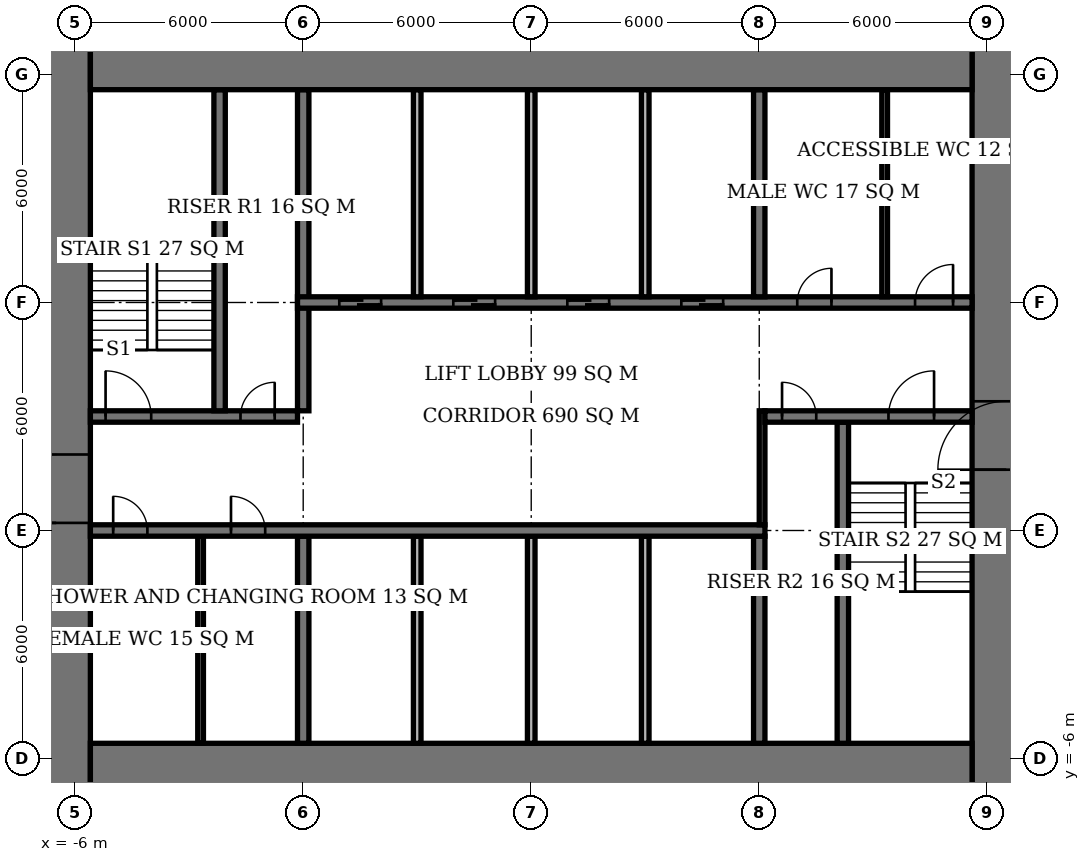
"""IFC4 building model, lengths in metres.
Left out: names, types, materials, properties, quantities, classifications, styles, units other than length and angle.
Written with IfcOpenShell. Run it as: python <this file> out.ifc"""

import sys

from ifc_helpers import new_model, si_unit, direction, frame, frame_2d, origin, place, context, subcontext, project, spatial, rectangle, extrude, element, fill, save


model = new_model("IFC4")
c1 = context("Model", 3, precision=1e-05, world=origin(), true_north=direction((0.0, 1.0)))
c2 = subcontext(c1, "Body", "Model", "MODEL_VIEW")
j1 = project(units=[si_unit("LENGTHUNIT", "METRE"), si_unit("PLANEANGLEUNIT", "RADIAN")], contexts=[c1])
p1 = place(None, origin())
s1 = spatial("IfcSite", under=j1, at=p1, CompositionType="ELEMENT")
p2 = place(p1, origin())
s2 = spatial("IfcBuilding", under=s1, at=p2, CompositionType="ELEMENT")
p3 = place(p2, frame((0.0, 0.0, 26.0)))
s3 = spatial("IfcBuildingStorey", under=s2, at=p3, CompositionType="ELEMENT", Elevation=26.0)
for number, where, z_axis, x_axis in (
    (1, (-5.6, -6.6, 0.0), (0.0, 0.0, 1.0), (1.0, 0.0, 0.0)),
    (2, (-5.6, 12.6, 0.0), (0.0, 0.0, 1.0), (1.0, 0.0, 0.0)),
):
    element("IfcWall", number, at=place(p3, frame(where, z_axis=z_axis, x_axis=x_axis)), inside=s3, PredefinedType="SHEAR", context=c2, shape_type="SweptSolid", body=[
        extrude(rectangle(XDim=23.2, YDim=2.0, at=frame_2d((11.6, 0.0))), origin(), (0.0, 0.0, 1.0), 3.9),
    ])
p4 = place(p3, frame((-6.5, -7.6, 0.0), z_axis=(0.0, 0.0, 1.0), x_axis=(0.0, 1.0, 0.0)))
e3 = element("IfcWall", 3, at=p4, inside=s3, PredefinedType="SHEAR", context=c2, shape_type="SweptSolid", body=[
    extrude(rectangle(XDim=21.2, YDim=1.8, at=frame_2d((10.6, 0.0))), origin(), (0.0, 0.0, 1.0), 3.9),
])
p5 = place(p4, frame((7.8, 0.0, 0.0)))
e4 = element("IfcOpeningElement", 4, at=p5, cuts=e3, PredefinedType="OPENING", context=c2, shape_type="SweptSolid", body=[
    extrude(rectangle(XDim=1.8, YDim=2.4, at=frame_2d((0.9, 1.2))), frame((0.0, 0.91, 0.0), z_axis=(0.0, -1.0, 0.0), x_axis=(1.0, 0.0, 0.0)), (0.0, 0.0, 1.0), 1.82),
])
p6 = place(p3, frame((18.5, -7.6, 0.0), z_axis=(0.0, 0.0, 1.0), x_axis=(0.0, 1.0, 0.0)))
e5 = element("IfcWall", 5, at=p6, inside=s3, PredefinedType="SHEAR", context=c2, shape_type="SweptSolid", body=[
    extrude(rectangle(XDim=21.2, YDim=1.8, at=frame_2d((10.6, 0.0))), origin(), (0.0, 0.0, 1.0), 3.9),
])
p7 = place(p6, frame((9.2, 0.0, 0.0)))
e6 = element("IfcOpeningElement", 6, at=p7, cuts=e5, PredefinedType="OPENING", context=c2, shape_type="SweptSolid", body=[
    extrude(rectangle(XDim=1.8, YDim=2.4, at=frame_2d((0.9, 1.2))), frame((0.0, 0.91, 0.0), z_axis=(0.0, -1.0, 0.0), x_axis=(1.0, 0.0, 0.0)), (0.0, 0.0, 1.0), 1.82),
])
p8 = place(p3, frame((-5.6, 0.0, 0.0), z_axis=(0.0, 0.0, 1.0), x_axis=(1.0, 0.0, 0.0)))
e7 = element("IfcWall", 7, at=p8, inside=s3, PredefinedType="SHEAR", context=c2, shape_type="SweptSolid", body=[
    extrude(rectangle(XDim=17.75, YDim=0.3, at=frame_2d((8.875, 0.0))), origin(), (0.0, 0.0, 1.0), 3.9),
])
p9 = place(p8, frame((0.6, 0.0, 0.0)))
e8 = element("IfcOpeningElement", 8, at=p9, cuts=e7, PredefinedType="OPENING", context=c2, shape_type="SweptSolid", body=[
    extrude(rectangle(XDim=0.9, YDim=2.1, at=frame_2d((0.45, 1.05))), frame((0.0, 0.16, 0.0), z_axis=(0.0, -1.0, 0.0), x_axis=(1.0, 0.0, 0.0)), (0.0, 0.0, 1.0), 0.32),
])
p10 = place(p8, frame((3.7, 0.0, 0.0)))
e9 = element("IfcOpeningElement", 9, at=p10, cuts=e7, PredefinedType="OPENING", context=c2, shape_type="SweptSolid", body=[
    extrude(rectangle(XDim=0.9, YDim=2.1, at=frame_2d((0.45, 1.05))), frame((0.0, 0.16, 0.0), z_axis=(0.0, -1.0, 0.0), x_axis=(1.0, 0.0, 0.0)), (0.0, 0.0, 1.0), 0.32),
])
p11 = place(p3, frame((-5.6, 3.0, 0.0), z_axis=(0.0, 0.0, 1.0), x_axis=(1.0, 0.0, 0.0)))
e10 = element("IfcWall", 10, at=p11, inside=s3, PredefinedType="SHEAR", context=c2, shape_type="SweptSolid", body=[
    extrude(rectangle(XDim=5.45, YDim=0.3, at=frame_2d((2.725, 0.0))), origin(), (0.0, 0.0, 1.0), 3.9),
])
p12 = place(p11, frame((0.4, 0.0, 0.0)))
e11 = element("IfcOpeningElement", 11, at=p12, cuts=e10, PredefinedType="OPENING", context=c2, shape_type="SweptSolid", body=[
    extrude(rectangle(XDim=1.2, YDim=2.1, at=frame_2d((0.6, 1.05))), frame((0.0, 0.16, 0.0), z_axis=(0.0, -1.0, 0.0), x_axis=(1.0, 0.0, 0.0)), (0.0, 0.0, 1.0), 0.32),
])
p13 = place(p11, frame((3.95, 0.0, 0.0)))
e12 = element("IfcOpeningElement", 12, at=p13, cuts=e10, PredefinedType="OPENING", context=c2, shape_type="SweptSolid", body=[
    extrude(rectangle(XDim=0.9, YDim=2.1, at=frame_2d((0.45, 1.05))), frame((0.0, 0.16, 0.0), z_axis=(0.0, -1.0, 0.0), x_axis=(1.0, 0.0, 0.0)), (0.0, 0.0, 1.0), 0.32),
])
p14 = place(p3, frame((12.15, 3.0, 0.0), z_axis=(0.0, 0.0, 1.0), x_axis=(1.0, 0.0, 0.0)))
e13 = element("IfcWall", 13, at=p14, inside=s3, PredefinedType="SHEAR", context=c2, shape_type="SweptSolid", body=[
    extrude(rectangle(XDim=5.45, YDim=0.3, at=frame_2d((2.725, 0.0))), origin(), (0.0, 0.0, 1.0), 3.9),
])
p15 = place(p14, frame((3.25, 0.0, 0.0)))
e14 = element("IfcOpeningElement", 14, at=p15, cuts=e13, PredefinedType="OPENING", context=c2, shape_type="SweptSolid", body=[
    extrude(rectangle(XDim=1.2, YDim=2.1, at=frame_2d((0.6, 1.05))), frame((0.0, 0.16, 0.0), z_axis=(0.0, -1.0, 0.0), x_axis=(1.0, 0.0, 0.0)), (0.0, 0.0, 1.0), 0.32),
])
p16 = place(p14, frame((0.45, 0.0, 0.0)))
e15 = element("IfcOpeningElement", 15, at=p16, cuts=e13, PredefinedType="OPENING", context=c2, shape_type="SweptSolid", body=[
    extrude(rectangle(XDim=0.9, YDim=2.1, at=frame_2d((0.45, 1.05))), frame((0.0, 0.16, 0.0), z_axis=(0.0, -1.0, 0.0), x_axis=(1.0, 0.0, 0.0)), (0.0, 0.0, 1.0), 0.32),
])
p17 = place(p3, frame((-0.15, 6.0, 0.0), z_axis=(0.0, 0.0, 1.0), x_axis=(1.0, 0.0, 0.0)))
e16 = element("IfcWall", 16, at=p17, inside=s3, PredefinedType="SHEAR", context=c2, shape_type="SweptSolid", body=[
    extrude(rectangle(XDim=17.75, YDim=0.3, at=frame_2d((8.875, 0.0))), origin(), (0.0, 0.0, 1.0), 3.9),
])
p18 = place(p17, frame((13.15, 0.0, 0.0)))
e17 = element("IfcOpeningElement", 17, at=p18, cuts=e16, PredefinedType="OPENING", context=c2, shape_type="SweptSolid", body=[
    extrude(rectangle(XDim=0.9, YDim=2.1, at=frame_2d((0.45, 1.05))), frame((0.0, 0.16, 0.0), z_axis=(0.0, -1.0, 0.0), x_axis=(1.0, 0.0, 0.0)), (0.0, 0.0, 1.0), 0.32),
])
p19 = place(p17, frame((16.25, 0.0, 0.0)))
e18 = element("IfcOpeningElement", 18, at=p19, cuts=e16, PredefinedType="OPENING", context=c2, shape_type="SweptSolid", body=[
    extrude(rectangle(XDim=1.0, YDim=2.1, at=frame_2d((0.5, 1.05))), frame((0.0, 0.16, 0.0), z_axis=(0.0, -1.0, 0.0), x_axis=(1.0, 0.0, 0.0)), (0.0, 0.0, 1.0), 0.32),
])
p20 = place(p17, frame((1.1, 0.0, 0.0)))
e19 = element("IfcOpeningElement", 19, at=p20, cuts=e16, PredefinedType="OPENING", context=c2, shape_type="SweptSolid", body=[
    extrude(rectangle(XDim=1.1, YDim=2.1, at=frame_2d((0.55, 1.05))), frame((0.0, 0.16, 0.0), z_axis=(0.0, -1.0, 0.0), x_axis=(1.0, 0.0, 0.0)), (0.0, 0.0, 1.0), 0.32),
])
p21 = place(p17, frame((4.1, 0.0, 0.0)))
e20 = element("IfcOpeningElement", 20, at=p21, cuts=e16, PredefinedType="OPENING", context=c2, shape_type="SweptSolid", body=[
    extrude(rectangle(XDim=1.1, YDim=2.1, at=frame_2d((0.55, 1.05))), frame((0.0, 0.16, 0.0), z_axis=(0.0, -1.0, 0.0), x_axis=(1.0, 0.0, 0.0)), (0.0, 0.0, 1.0), 0.32),
])
p22 = place(p17, frame((7.1, 0.0, 0.0)))
e21 = element("IfcOpeningElement", 21, at=p22, cuts=e16, PredefinedType="OPENING", context=c2, shape_type="SweptSolid", body=[
    extrude(rectangle(XDim=1.1, YDim=2.1, at=frame_2d((0.55, 1.05))), frame((0.0, 0.16, 0.0), z_axis=(0.0, -1.0, 0.0), x_axis=(1.0, 0.0, 0.0)), (0.0, 0.0, 1.0), 0.32),
])
p23 = place(p17, frame((10.1, 0.0, 0.0)))
e22 = element("IfcOpeningElement", 22, at=p23, cuts=e16, PredefinedType="OPENING", context=c2, shape_type="SweptSolid", body=[
    extrude(rectangle(XDim=1.1, YDim=2.1, at=frame_2d((0.55, 1.05))), frame((0.0, 0.16, 0.0), z_axis=(0.0, -1.0, 0.0), x_axis=(1.0, 0.0, 0.0)), (0.0, 0.0, 1.0), 0.32),
])
p24 = place(p3, frame((0.0, -5.6, 0.0), z_axis=(0.0, 0.0, 1.0), x_axis=(0.0, 1.0, 0.0)))
e23 = element("IfcWall", 23, at=p24, inside=s3, PredefinedType="SHEAR", context=c2, shape_type="SweptSolid", body=[
    extrude(rectangle(XDim=5.45, YDim=0.3, at=frame_2d((2.725, 0.0))), origin(), (0.0, 0.0, 1.0), 3.9),
])
p25 = place(p3, frame((0.0, 3.15, 0.0), z_axis=(0.0, 0.0, 1.0), x_axis=(0.0, 1.0, 0.0)))
e24 = element("IfcWall", 24, at=p25, inside=s3, PredefinedType="SHEAR", context=c2, shape_type="SweptSolid", body=[
    extrude(rectangle(XDim=8.45, YDim=0.3, at=frame_2d((4.225, 0.0))), origin(), (0.0, 0.0, 1.0), 3.9),
])
for number, where, z_axis, x_axis in (
    (25, (12.0, -5.6, 0.0), (0.0, 0.0, 1.0), (0.0, 1.0, 0.0)),
    (26, (12.0, 6.15, 0.0), (0.0, 0.0, 1.0), (0.0, 1.0, 0.0)),
):
    element("IfcWall", number, at=place(p3, frame(where, z_axis=z_axis, x_axis=x_axis)), inside=s3, PredefinedType="SHEAR", context=c2, shape_type="SweptSolid", body=[
        extrude(rectangle(XDim=5.45, YDim=0.3, at=frame_2d((2.725, 0.0))), origin(), (0.0, 0.0, 1.0), 3.9),
    ])
for number, where, z_axis, x_axis in (
    (27, (-2.2, 3.15, 0.0), (0.0, 0.0, 1.0), (0.0, 1.0, 0.0)),
    (28, (14.2, -5.6, 0.0), (0.0, 0.0, 1.0), (0.0, 1.0, 0.0)),
):
    element("IfcWall", number, at=place(p3, frame(where, z_axis=z_axis, x_axis=x_axis)), inside=s3, PredefinedType="SHEAR", context=c2, shape_type="SweptSolid", body=[
        extrude(rectangle(XDim=8.45, YDim=0.3, at=frame_2d((4.225, 0.0))), origin(), (0.0, 0.0, 1.0), 3.9),
    ])
for number, where, z_axis, x_axis in (
    (29, (3.0, 6.15, 0.0), (0.0, 0.0, 1.0), (0.0, 1.0, 0.0)),
    (30, (6.0, 6.15, 0.0), (0.0, 0.0, 1.0), (0.0, 1.0, 0.0)),
    (31, (9.0, 6.15, 0.0), (0.0, 0.0, 1.0), (0.0, 1.0, 0.0)),
    (32, (3.0, -5.6, 0.0), (0.0, 0.0, 1.0), (0.0, 1.0, 0.0)),
    (33, (6.0, -5.6, 0.0), (0.0, 0.0, 1.0), (0.0, 1.0, 0.0)),
    (34, (9.0, -5.6, 0.0), (0.0, 0.0, 1.0), (0.0, 1.0, 0.0)),
):
    element("IfcWall", number, at=place(p3, frame(where, z_axis=z_axis, x_axis=x_axis)), inside=s3, PredefinedType="SOLIDWALL", context=c2, shape_type="SweptSolid", body=[
        extrude(rectangle(XDim=5.45, YDim=0.2, at=frame_2d((2.725, 0.0))), origin(), (0.0, 0.0, 1.0), 3.9),
    ])
for number, where, z_axis, x_axis in (
    (35, (-2.7, -5.6, 0.0), (0.0, 0.0, 1.0), (0.0, 1.0, 0.0)),
    (36, (15.3, 6.15, 0.0), (0.0, 0.0, 1.0), (0.0, 1.0, 0.0)),
):
    element("IfcWall", number, at=place(p3, frame(where, z_axis=z_axis, x_axis=x_axis)), inside=s3, PredefinedType="PLUMBINGWALL", context=c2, shape_type="SweptSolid", body=[
        extrude(rectangle(XDim=5.45, YDim=0.15, at=frame_2d((2.725, 0.0))), origin(), (0.0, 0.0, 1.0), 3.65),
    ])
p26 = place(p3, frame((12.075, 0.15, 0.0), z_axis=(0.0, 0.0, 1.0), x_axis=(0.0, 1.0, 0.0)))
e37 = element("IfcWall", 37, at=p26, inside=s3, PredefinedType="PARTITIONING", context=c2, shape_type="SweptSolid", body=[
    extrude(rectangle(XDim=3.0, YDim=0.15, at=frame_2d((1.5, 0.0))), origin(), (0.0, 0.0, 1.0), 3.65),
])
p27 = place(p5, origin())
e38 = element("IfcDoor", 38, at=p27, inside=s3, OperationType="DOUBLE_DOOR_SINGLE_SWING", PredefinedType="DOOR", context=c2, shape_type="SweptSolid", body=[
    extrude(rectangle(XDim=1.8, YDim=2.4, at=frame_2d((0.9, 1.2))), frame((0.0, 0.025, 0.0), z_axis=(0.0, -1.0, 0.0), x_axis=(1.0, 0.0, 0.0)), (0.0, 0.0, 1.0), 0.05),
])
fill(e4, e38)
p28 = place(p7, origin())
e39 = element("IfcDoor", 39, at=p28, inside=s3, OperationType="DOUBLE_DOOR_SINGLE_SWING", PredefinedType="DOOR", context=c2, shape_type="SweptSolid", body=[
    extrude(rectangle(XDim=1.8, YDim=2.4, at=frame_2d((0.9, 1.2))), frame((0.0, 0.025, 0.0), z_axis=(0.0, -1.0, 0.0), x_axis=(1.0, 0.0, 0.0)), (0.0, 0.0, 1.0), 0.05),
])
fill(e6, e39)
p29 = place(p12, origin())
e40 = element("IfcDoor", 40, at=p29, inside=s3, OperationType="SINGLE_SWING_LEFT", PredefinedType="DOOR", context=c2, shape_type="SweptSolid", body=[
    extrude(rectangle(XDim=1.2, YDim=2.1, at=frame_2d((0.6, 1.05))), frame((0.0, 0.025, 0.0), z_axis=(0.0, -1.0, 0.0), x_axis=(1.0, 0.0, 0.0)), (0.0, 0.0, 1.0), 0.05),
])
fill(e11, e40)
p30 = place(p13, origin())
e41 = element("IfcDoor", 41, at=p30, inside=s3, OperationType="SINGLE_SWING_RIGHT", PredefinedType="DOOR", context=c2, shape_type="SweptSolid", body=[
    extrude(rectangle(XDim=0.9, YDim=2.1, at=frame_2d((0.45, 1.05))), frame((0.0, 0.025, 0.0), z_axis=(0.0, -1.0, 0.0), x_axis=(1.0, 0.0, 0.0)), (0.0, 0.0, 1.0), 0.05),
])
fill(e12, e41)
p31 = place(p15, origin())
e42 = element("IfcDoor", 42, at=p31, inside=s3, OperationType="SINGLE_SWING_RIGHT", PredefinedType="DOOR", context=c2, shape_type="SweptSolid", body=[
    extrude(rectangle(XDim=1.2, YDim=2.1, at=frame_2d((0.6, 1.05))), frame((0.0, 0.025, 0.0), z_axis=(0.0, -1.0, 0.0), x_axis=(1.0, 0.0, 0.0)), (0.0, 0.0, 1.0), 0.05),
])
fill(e14, e42)
p32 = place(p16, origin())
e43 = element("IfcDoor", 43, at=p32, inside=s3, OperationType="SINGLE_SWING_LEFT", PredefinedType="DOOR", context=c2, shape_type="SweptSolid", body=[
    extrude(rectangle(XDim=0.9, YDim=2.1, at=frame_2d((0.45, 1.05))), frame((0.0, 0.025, 0.0), z_axis=(0.0, -1.0, 0.0), x_axis=(1.0, 0.0, 0.0)), (0.0, 0.0, 1.0), 0.05),
])
fill(e15, e43)
p33 = place(p9, origin())
e44 = element("IfcDoor", 44, at=p33, inside=s3, OperationType="SINGLE_SWING_LEFT", PredefinedType="DOOR", context=c2, shape_type="SweptSolid", body=[
    extrude(rectangle(XDim=0.9, YDim=2.1, at=frame_2d((0.45, 1.05))), frame((0.0, 0.025, 0.0), z_axis=(0.0, -1.0, 0.0), x_axis=(1.0, 0.0, 0.0)), (0.0, 0.0, 1.0), 0.05),
])
fill(e8, e44)
p34 = place(p10, origin())
e45 = element("IfcDoor", 45, at=p34, inside=s3, OperationType="SINGLE_SWING_LEFT", PredefinedType="DOOR", context=c2, shape_type="SweptSolid", body=[
    extrude(rectangle(XDim=0.9, YDim=2.1, at=frame_2d((0.45, 1.05))), frame((0.0, 0.025, 0.0), z_axis=(0.0, -1.0, 0.0), x_axis=(1.0, 0.0, 0.0)), (0.0, 0.0, 1.0), 0.05),
])
fill(e9, e45)
p35 = place(p18, origin())
e46 = element("IfcDoor", 46, at=p35, inside=s3, OperationType="SINGLE_SWING_RIGHT", PredefinedType="DOOR", context=c2, shape_type="SweptSolid", body=[
    extrude(rectangle(XDim=0.9, YDim=2.1, at=frame_2d((0.45, 1.05))), frame((0.0, 0.025, 0.0), z_axis=(0.0, -1.0, 0.0), x_axis=(1.0, 0.0, 0.0)), (0.0, 0.0, 1.0), 0.05),
])
fill(e17, e46)
p36 = place(p19, origin())
e47 = element("IfcDoor", 47, at=p36, inside=s3, OperationType="SINGLE_SWING_RIGHT", PredefinedType="DOOR", context=c2, shape_type="SweptSolid", body=[
    extrude(rectangle(XDim=1.0, YDim=2.1, at=frame_2d((0.5, 1.05))), frame((0.0, 0.025, 0.0), z_axis=(0.0, -1.0, 0.0), x_axis=(1.0, 0.0, 0.0)), (0.0, 0.0, 1.0), 0.05),
])
fill(e18, e47)
p37 = place(p20, origin())
e48 = element("IfcDoor", 48, at=p37, inside=s3, OperationType="DOUBLE_DOOR_SLIDING", PredefinedType="USERDEFINED", context=c2, shape_type="SweptSolid", body=[
    extrude(rectangle(XDim=1.1, YDim=2.1, at=frame_2d((0.55, 1.05))), frame((0.0, 0.025, 0.0), z_axis=(0.0, -1.0, 0.0), x_axis=(1.0, 0.0, 0.0)), (0.0, 0.0, 1.0), 0.05),
])
fill(e19, e48)
p38 = place(p21, origin())
e49 = element("IfcDoor", 49, at=p38, inside=s3, OperationType="DOUBLE_DOOR_SLIDING", PredefinedType="USERDEFINED", context=c2, shape_type="SweptSolid", body=[
    extrude(rectangle(XDim=1.1, YDim=2.1, at=frame_2d((0.55, 1.05))), frame((0.0, 0.025, 0.0), z_axis=(0.0, -1.0, 0.0), x_axis=(1.0, 0.0, 0.0)), (0.0, 0.0, 1.0), 0.05),
])
fill(e20, e49)
p39 = place(p22, origin())
e50 = element("IfcDoor", 50, at=p39, inside=s3, OperationType="DOUBLE_DOOR_SLIDING", PredefinedType="USERDEFINED", context=c2, shape_type="SweptSolid", body=[
    extrude(rectangle(XDim=1.1, YDim=2.1, at=frame_2d((0.55, 1.05))), frame((0.0, 0.025, 0.0), z_axis=(0.0, -1.0, 0.0), x_axis=(1.0, 0.0, 0.0)), (0.0, 0.0, 1.0), 0.05),
])
fill(e21, e50)
p40 = place(p23, origin())
e51 = element("IfcDoor", 51, at=p40, inside=s3, OperationType="DOUBLE_DOOR_SLIDING", PredefinedType="USERDEFINED", context=c2, shape_type="SweptSolid", body=[
    extrude(rectangle(XDim=1.1, YDim=2.1, at=frame_2d((0.55, 1.05))), frame((0.0, 0.025, 0.0), z_axis=(0.0, -1.0, 0.0), x_axis=(1.0, 0.0, 0.0)), (0.0, 0.0, 1.0), 0.05),
])
fill(e22, e51)
save(model, sys.argv[1])
